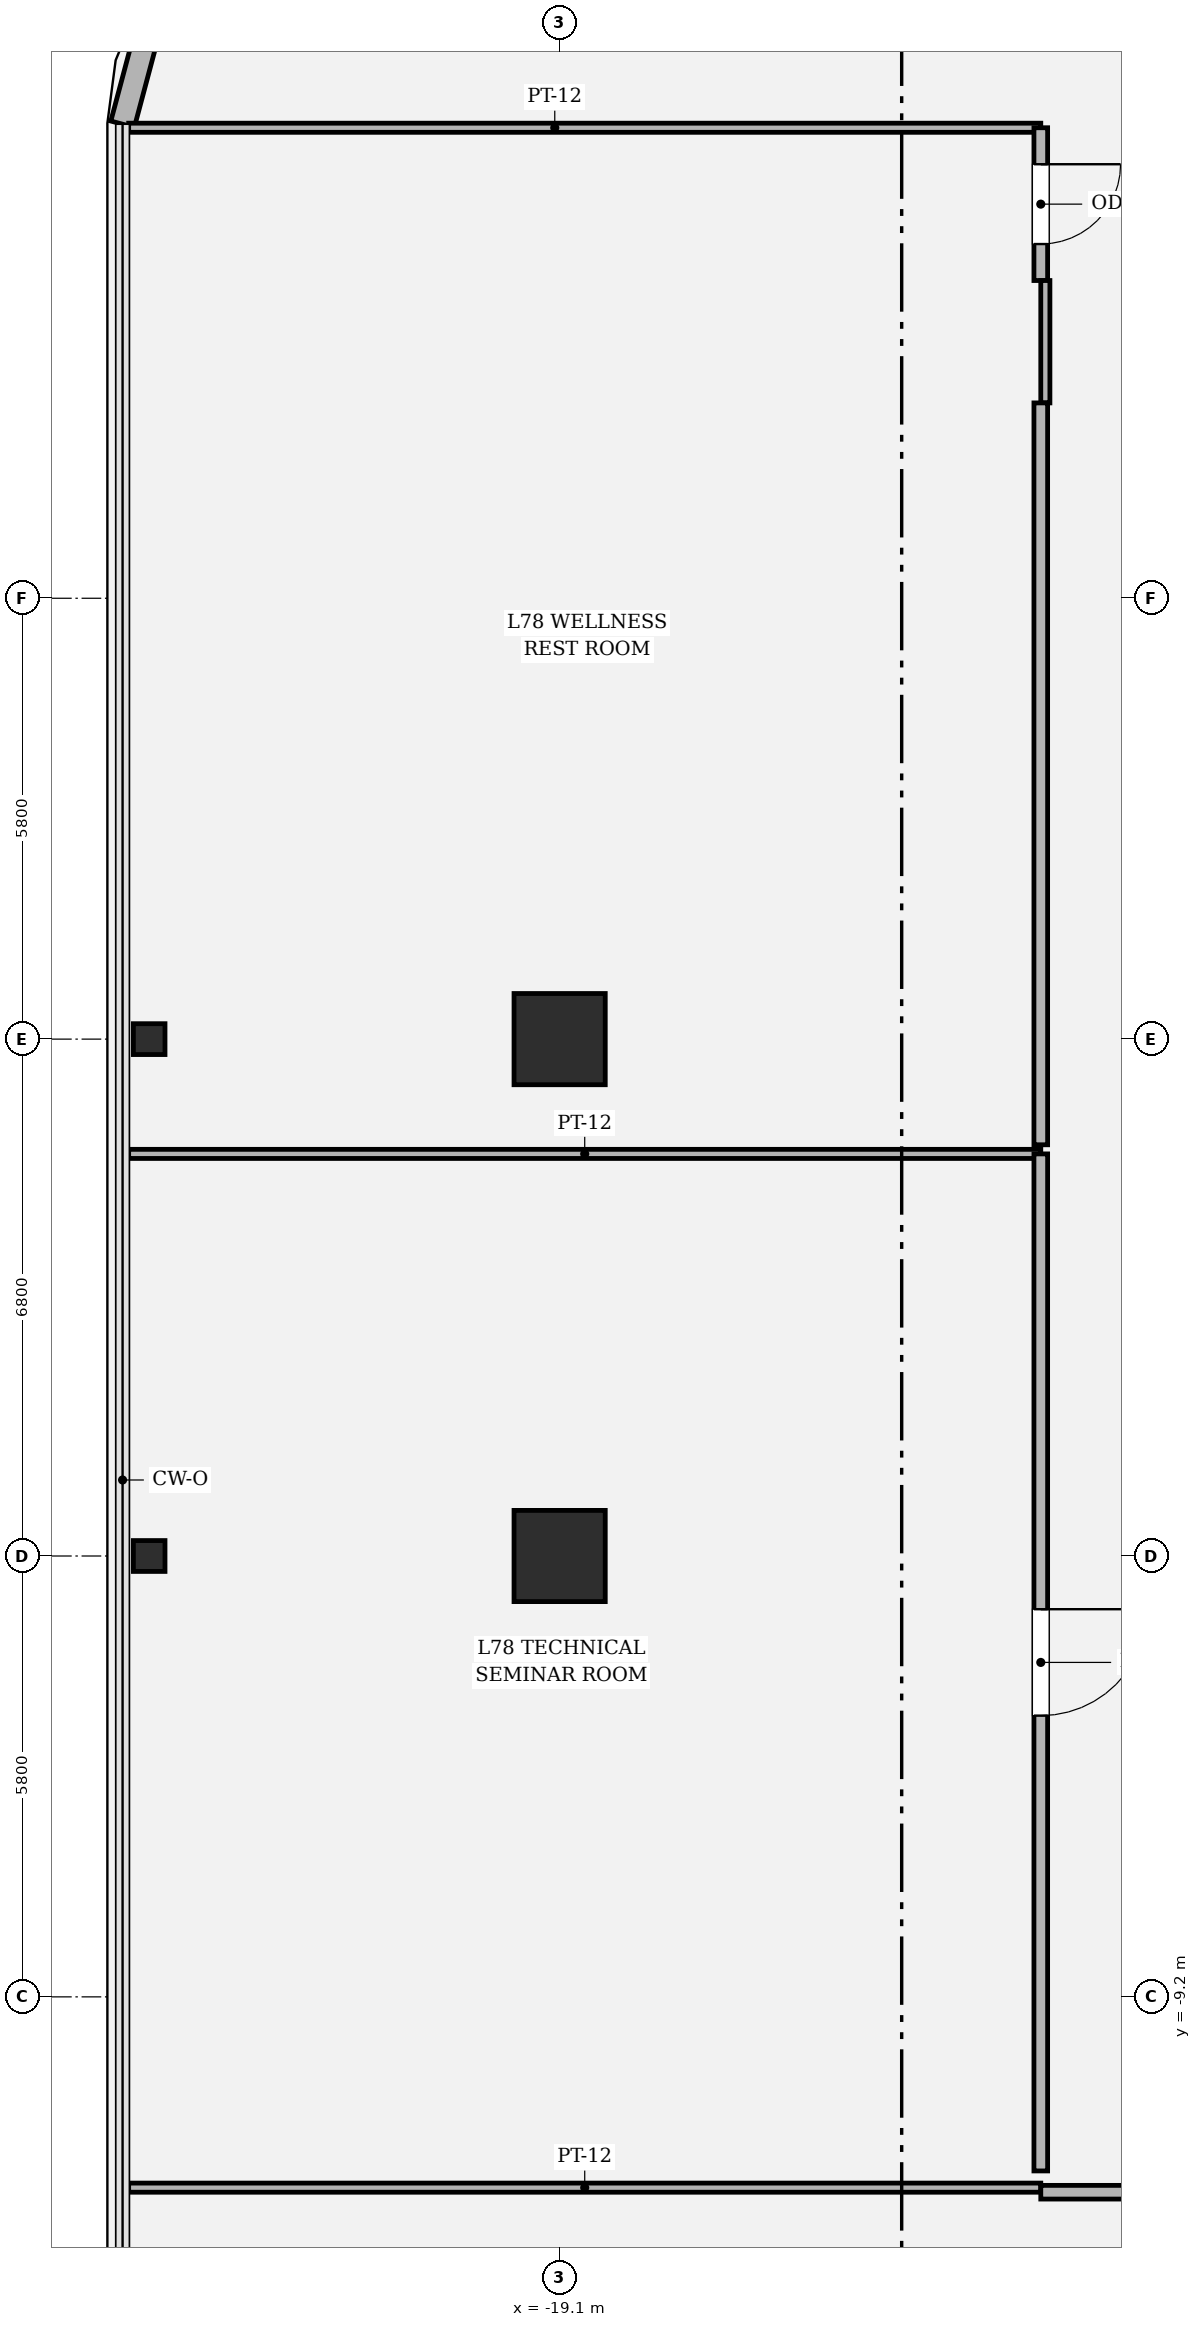
"""IFC4 building model, lengths in metres.
Left out: names, types, materials, properties, quantities, classifications, styles, units other than length and angle.
Written with IfcOpenShell. Run it as: python <this file> out.ifc"""

import sys

from ifc_helpers import new_model, si_unit, direction, frame, frame_2d, origin, origin_2d, place, context, subcontext, project, spatial, rectangle, hollow_rectangle, i_section, extrude, element, fill, save


model = new_model("IFC4")
c1 = context("Model", 3, precision=1e-05, world=origin(), true_north=direction((0.0, 1.0)))
c2 = subcontext(c1, "Body", "Model", "MODEL_VIEW")
j1 = project(units=[si_unit("LENGTHUNIT", "METRE"), si_unit("PLANEANGLEUNIT", "RADIAN")], contexts=[c1])
p1 = place(None, origin())
s1 = spatial("IfcSite", under=j1, at=p1, CompositionType="ELEMENT")
p2 = place(p1, origin())
s2 = spatial("IfcBuilding", under=s1, at=p2, CompositionType="ELEMENT")
p3 = place(p2, frame((0.0, 0.0, 330.0)))
s3 = spatial("IfcBuildingStorey", under=s2, at=p3, CompositionType="ELEMENT", Elevation=330.0)
for number, where, z_axis, x_axis in (
    (1, (-19.1, 3.4, 0.0), (0.0, 0.0, 1.0), (1.0, 0.0, 0.0)),
    (2, (-19.1, -3.4, 0.0), (0.0, 0.0, 1.0), (1.0, 0.0, 0.0)),
):
    element("IfcColumn", number, at=place(p3, frame(where, z_axis=z_axis, x_axis=x_axis)), inside=s3, PredefinedType="COLUMN", context=c2, shape_type="SweptSolid", body=[
        extrude(hollow_rectangle(XDim=1.2, YDim=1.2, WallThickness=0.035, at=origin_2d()), origin(), (0.0, 0.0, 1.0), 4.2),
    ])
for number, where, z_axis, x_axis in (
    (3, (-24.5, -3.4, 0.0), (0.0, 0.0, 1.0), (0.0, 1.0, 0.0)),
    (4, (-24.5, 3.4, 0.0), (0.0, 0.0, 1.0), (0.0, 1.0, 0.0)),
):
    element("IfcColumn", number, at=place(p3, frame(where, z_axis=z_axis, x_axis=x_axis)), inside=s3, PredefinedType="COLUMN", context=c2, shape_type="SweptSolid", body=[
        extrude(i_section(OverallWidth=0.406, OverallDepth=0.416, WebThickness=0.029, FlangeThickness=0.048, FilletRadius=0.018, at=origin_2d()), origin(), (0.0, 0.0, 1.0), 4.198),
    ])
p4 = place(p3, frame((-24.447, 16.949, 0.0), z_axis=(0.0, 0.0, 1.0), x_axis=(-0.257847112249, -0.966185730957, 0.0)))
e5 = element("IfcWall", 5, at=p4, inside=s3, PredefinedType="SOLIDWALL", context=c2, shape_type="SweptSolid", body=[
    extrude(rectangle(XDim=1.565, YDim=0.32, at=frame_2d((0.783, 0.0))), origin(), (0.0, 0.0, 1.0), 2.614),
])
p5 = place(p3, frame((-24.77, -11.71, 0.0), z_axis=(0.0, 0.0, 1.0), x_axis=(1.0, 0.0, 0.0)))
e6 = element("IfcWall", 6, at=p5, inside=s3, PredefinedType="PARTITIONING", context=c2, shape_type="SweptSolid", body=[
    extrude(rectangle(XDim=12.0, YDim=0.12, at=frame_2d((6.0, 0.0))), origin(), (0.0, 0.0, 1.0), 2.614),
])
p6 = place(p3, frame((-12.77, -11.77, 0.0), z_axis=(0.0, 0.0, 1.0), x_axis=(1.0, 0.0, 0.0)))
e7 = element("IfcWall", 7, at=p6, inside=s3, PredefinedType="PARTITIONING", context=c2, shape_type="SweptSolid", body=[
    extrude(rectangle(XDim=3.365, YDim=0.18, at=frame_2d((1.683, 0.0))), origin(), (0.0, 0.0, 1.0), 2.614),
])
p7 = place(p6, frame((1.157, 0.0, 0.0)))
e8 = element("IfcOpeningElement", 8, at=p7, cuts=e7, PredefinedType="OPENING", context=c2, shape_type="SweptSolid", body=[
    extrude(rectangle(XDim=1.05, YDim=2.2, at=frame_2d((0.525, 1.1))), frame((0.0, 0.1, 0.0), z_axis=(0.0, -1.0, 0.0), x_axis=(1.0, 0.0, 0.0)), (0.0, 0.0, 1.0), 0.2),
])
p8 = place(p3, frame((-24.77, 1.89, 0.0), z_axis=(0.0, 0.0, 1.0), x_axis=(1.0, 0.0, 0.0)))
e9 = element("IfcWall", 9, at=p8, inside=s3, PredefinedType="PARTITIONING", context=c2, shape_type="SweptSolid", body=[
    extrude(rectangle(XDim=12.0, YDim=0.12, at=frame_2d((6.0, 0.0))), origin(), (0.0, 0.0, 1.0), 2.614),
])
p9 = place(p3, frame((-12.77, 1.89, 0.0), z_axis=(0.0, 0.0, 1.0), x_axis=(0.0, -1.0, 0.0)))
e10 = element("IfcWall", 10, at=p9, inside=s3, PredefinedType="PARTITIONING", context=c2, shape_type="SweptSolid", body=[
    extrude(rectangle(XDim=13.38, YDim=0.18, at=frame_2d((6.69, 0.0))), origin(), (0.0, 0.0, 1.0), 2.614),
])
p10 = place(p9, frame((5.99, 0.0, 0.0)))
e11 = element("IfcOpeningElement", 11, at=p10, cuts=e10, PredefinedType="OPENING", context=c2, shape_type="SweptSolid", body=[
    extrude(rectangle(XDim=1.4, YDim=2.25, at=frame_2d((0.7, 1.125))), frame((0.0, 0.1, 0.0), z_axis=(0.0, -1.0, 0.0), x_axis=(1.0, 0.0, 0.0)), (0.0, 0.0, 1.0), 0.2),
])
p11 = place(p3, frame((-24.77, 15.39, 0.0), z_axis=(0.0, 0.0, 1.0), x_axis=(1.0, 0.0, 0.0)))
e12 = element("IfcWall", 12, at=p11, inside=s3, PredefinedType="PARTITIONING", context=c2, shape_type="SweptSolid", body=[
    extrude(rectangle(XDim=12.0, YDim=0.12, at=frame_2d((6.0, 0.0))), origin(), (0.0, 0.0, 1.0), 2.614),
])
p12 = place(p3, frame((-12.77, 15.39, 0.0), z_axis=(0.0, 0.0, 1.0), x_axis=(0.0, -1.0, 0.0)))
e13 = element("IfcWall", 13, at=p12, inside=s3, PredefinedType="PARTITIONING", context=c2, shape_type="SweptSolid", body=[
    extrude(rectangle(XDim=2.01, YDim=0.18, at=frame_2d((1.005, 0.0))), origin(), (0.0, 0.0, 1.0), 3.574),
])
p13 = place(p12, frame((0.48, 0.0, 0.0)))
e14 = element("IfcOpeningElement", 14, at=p13, cuts=e13, PredefinedType="OPENING", context=c2, shape_type="SweptSolid", body=[
    extrude(rectangle(XDim=1.05, YDim=2.2, at=frame_2d((0.525, 1.1))), frame((0.0, 0.1, 0.0), z_axis=(0.0, -1.0, 0.0), x_axis=(1.0, 0.0, 0.0)), (0.0, 0.0, 1.0), 0.2),
])
p14 = place(p3, frame((-12.71, 13.38, 0.0), z_axis=(0.0, 0.0, 1.0), x_axis=(0.0, -1.0, 0.0)))
e15 = element("IfcWall", 15, at=p14, inside=s3, PredefinedType="PARTITIONING", context=c2, shape_type="SweptSolid", body=[
    extrude(rectangle(XDim=1.61, YDim=0.12, at=frame_2d((0.805, 0.0))), origin(), (0.0, 0.0, 1.0), 3.574),
])
p15 = place(p3, frame((-12.77, 11.77, 0.0), z_axis=(0.0, 0.0, 1.0), x_axis=(0.0, -1.0, 0.0)))
e16 = element("IfcWall", 16, at=p15, inside=s3, PredefinedType="PARTITIONING", context=c2, shape_type="SweptSolid", body=[
    extrude(rectangle(XDim=9.76, YDim=0.18, at=frame_2d((4.88, 0.0))), origin(), (0.0, 0.0, 1.0), 2.614),
])
p16 = place(p10, origin())
e17 = element("IfcDoor", 17, at=p16, inside=s3, OperationType="SINGLE_SWING_LEFT", PredefinedType="DOOR", context=c2, shape_type="SweptSolid", body=[
    extrude(rectangle(XDim=1.4, YDim=2.25, at=frame_2d((0.7, 1.125))), frame((0.0, 0.025, 0.0), z_axis=(0.0, -1.0, 0.0), x_axis=(1.0, 0.0, 0.0)), (0.0, 0.0, 1.0), 0.05),
])
fill(e11, e17)
p17 = place(p13, origin())
e18 = element("IfcDoor", 18, at=p17, inside=s3, OperationType="SINGLE_SWING_LEFT", PredefinedType="DOOR", context=c2, shape_type="SweptSolid", body=[
    extrude(rectangle(XDim=1.05, YDim=2.2, at=frame_2d((0.525, 1.1))), frame((0.0, 0.025, 0.0), z_axis=(0.0, -1.0, 0.0), x_axis=(1.0, 0.0, 0.0)), (0.0, 0.0, 1.0), 0.05),
])
fill(e14, e18)
save(model, sys.argv[1])
